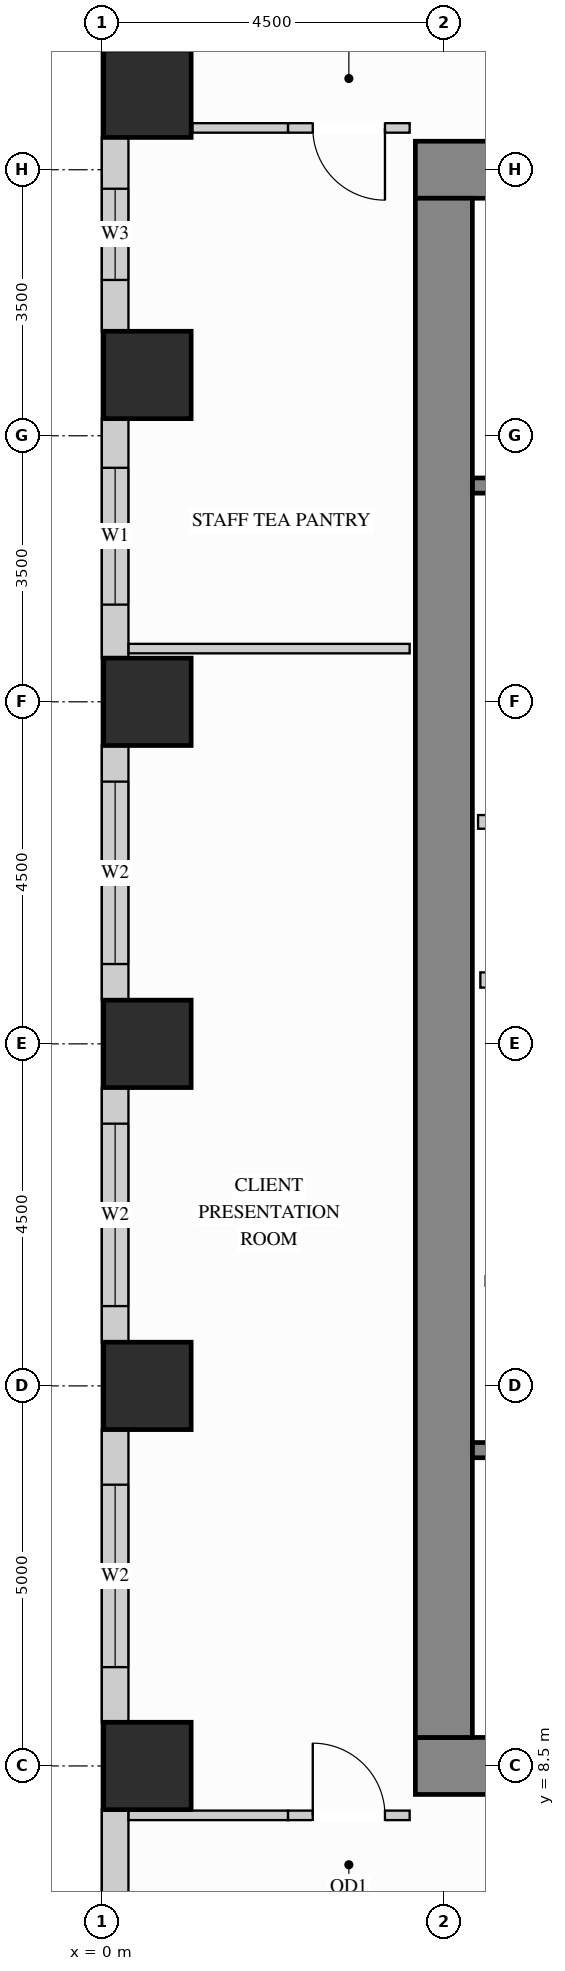
"""IFC4 building model, lengths in metres.
Left out: names, types, materials, properties, quantities, classifications, styles, units other than length and angle.
Written with IfcOpenShell. Run it as: python <this file> out.ifc"""

import sys

from ifc_helpers import new_model, si_unit, direction, frame, frame_2d, origin, origin_2d, place, context, subcontext, project, spatial, rectangle, extrude, source, transform, mapped, element, fill, save


model = new_model("IFC4")
c1 = context("Model", 3, precision=1e-05, world=origin(), true_north=direction((0.0, 1.0)))
c2 = subcontext(c1, "Body", "Model", "MODEL_VIEW")
j1 = project(units=[si_unit("LENGTHUNIT", "METRE"), si_unit("PLANEANGLEUNIT", "RADIAN")], contexts=[c1])
p1 = place(None, origin())
s1 = spatial("IfcSite", under=j1, at=p1, CompositionType="ELEMENT")
p2 = place(p1, origin())
s2 = spatial("IfcBuilding", under=s1, at=p2, CompositionType="ELEMENT")
p3 = place(p2, frame((0.0, 0.0, 135.0)))
s3 = spatial("IfcBuildingStorey", under=s2, at=p3, CompositionType="ELEMENT", Elevation=135.0)
m1 = source(origin(), c2, "Body", "SweptSolid", [
    extrude(rectangle(XDim=1.15, YDim=1.15, at=origin_2d()), origin(), (0.0, 0.0, 1.0), 3.32),
])
for number, where, z_axis, x_axis in (
    (1, (0.6, 13.5, 0.0), (0.0, 0.0, 1.0), (1.0, 0.0, 0.0)),
    (2, (0.6, 18.0, 0.0), (0.0, 0.0, 1.0), (1.0, 0.0, 0.0)),
    (3, (0.6, 22.5, 0.0), (0.0, 0.0, 1.0), (1.0, 0.0, 0.0)),
    (4, (0.6, 26.8, 0.0), (0.0, 0.0, 1.0), (1.0, 0.0, 0.0)),
    (5, (0.6, 30.5, 0.0), (0.0, 0.0, 1.0), (1.0, 0.0, 0.0)),
    (6, (0.6, 8.5, 0.0), (0.0, 0.0, 1.0), (1.0, 0.0, 0.0)),
):
    element("IfcColumn", number, at=place(p3, frame(where, z_axis=z_axis, x_axis=x_axis)), inside=s3, PredefinedType="COLUMN", context=c2, shape_type="MappedRepresentation", body=[
        mapped(m1, transform((0.0, 0.0, 0.0), x_axis=(1.0, 0.0, 0.0), y_axis=(0.0, 1.0, 0.0), z_axis=(0.0, 0.0, 1.0))),
    ])
m2 = source(origin(), c2, "Body", "SweptSolid", [
    extrude(rectangle(XDim=10.75, YDim=0.75, at=frame_2d((5.375, 0.0))), origin(), (0.0, 0.0, 1.0), 3.32),
])
for number, where, z_axis, x_axis in (
    (7, (4.125, 29.5, 0.0), (0.0, 0.0, 1.0), (1.0, 0.0, 0.0)),
    (8, (4.125, 8.5, 0.0), (0.0, 0.0, 1.0), (1.0, 0.0, 0.0)),
):
    element("IfcWall", number, at=place(p3, frame(where, z_axis=z_axis, x_axis=x_axis)), inside=s3, PredefinedType="SHEAR", context=c2, shape_type="MappedRepresentation", body=[
        mapped(m2, transform((0.0, 0.0, 0.0), x_axis=(1.0, 0.0, 0.0), y_axis=(0.0, 1.0, 0.0), z_axis=(0.0, 0.0, 1.0))),
    ])
m3 = source(origin(), c2, "Body", "SweptSolid", [
    extrude(rectangle(XDim=20.25, YDim=0.75, at=frame_2d((10.125, 0.0))), origin(), (0.0, 0.0, 1.0), 3.32),
])
p4 = place(p3, frame((4.5, 8.875, 0.0), z_axis=(0.0, 0.0, 1.0), x_axis=(0.0, 1.0, 0.0)))
e9 = element("IfcWall", 9, at=p4, inside=s3, PredefinedType="SHEAR", context=c2, shape_type="MappedRepresentation", body=[
    mapped(m3, transform((0.0, 0.0, 0.0), x_axis=(1.0, 0.0, 0.0), y_axis=(0.0, 1.0, 0.0), z_axis=(0.0, 0.0, 1.0))),
])
p5 = place(p3, frame((0.175, 29.927, 0.0), z_axis=(0.0, 0.0, 1.0), x_axis=(0.0, -1.0, 0.0)))
e10 = element("IfcWall", 10, at=p5, inside=s3, PredefinedType="SOLIDWALL", context=c2, shape_type="SweptSolid", body=[
    extrude(rectangle(XDim=2.554, YDim=0.35, at=frame_2d((1.277, 0.0))), origin(), (0.0, 0.0, 1.0), 3.305),
])
p6 = place(p5, frame((0.677, 0.0, 0.78)))
e11 = element("IfcOpeningElement", 11, at=p6, cuts=e10, PredefinedType="OPENING", context=c2, shape_type="SweptSolid", body=[
    extrude(rectangle(XDim=1.2, YDim=2.1, at=frame_2d((0.6, 1.05))), frame((0.0, 0.185, 0.0), z_axis=(0.0, -1.0, 0.0), x_axis=(1.0, 0.0, 0.0)), (0.0, 0.0, 1.0), 0.37),
])
p7 = place(p3, frame((0.175, 26.227, 0.0), z_axis=(0.0, 0.0, 1.0), x_axis=(0.0, -1.0, 0.0)))
e12 = element("IfcWall", 12, at=p7, inside=s3, PredefinedType="SOLIDWALL", context=c2, shape_type="SweptSolid", body=[
    extrude(rectangle(XDim=3.154, YDim=0.35, at=frame_2d((1.577, 0.0))), origin(), (0.0, 0.0, 1.0), 3.305),
])
p8 = place(p7, frame((0.648, 0.0, 0.78)))
e13 = element("IfcOpeningElement", 13, at=p8, cuts=e12, PredefinedType="OPENING", context=c2, shape_type="SweptSolid", body=[
    extrude(rectangle(XDim=1.8, YDim=2.1, at=frame_2d((0.9, 1.05))), frame((0.0, 0.185, 0.0), z_axis=(0.0, -1.0, 0.0), x_axis=(1.0, 0.0, 0.0)), (0.0, 0.0, 1.0), 0.37),
])
p9 = place(p3, frame((0.175, 21.927, 0.0), z_axis=(0.0, 0.0, 1.0), x_axis=(0.0, -1.0, 0.0)))
e14 = element("IfcWall", 14, at=p9, inside=s3, PredefinedType="SOLIDWALL", context=c2, shape_type="SweptSolid", body=[
    extrude(rectangle(XDim=3.354, YDim=0.35, at=frame_2d((1.677, 0.0))), origin(), (0.0, 0.0, 1.0), 3.305),
])
p10 = place(p9, frame((0.477, 0.0, 0.78)))
e15 = element("IfcOpeningElement", 15, at=p10, cuts=e14, PredefinedType="OPENING", context=c2, shape_type="SweptSolid", body=[
    extrude(rectangle(XDim=2.4, YDim=2.1, at=frame_2d((1.2, 1.05))), frame((0.0, 0.185, 0.0), z_axis=(0.0, -1.0, 0.0), x_axis=(1.0, 0.0, 0.0)), (0.0, 0.0, 1.0), 0.37),
])
p11 = place(p3, frame((0.175, 17.427, 0.0), z_axis=(0.0, 0.0, 1.0), x_axis=(0.0, -1.0, 0.0)))
e16 = element("IfcWall", 16, at=p11, inside=s3, PredefinedType="SOLIDWALL", context=c2, shape_type="SweptSolid", body=[
    extrude(rectangle(XDim=3.354, YDim=0.35, at=frame_2d((1.677, 0.0))), origin(), (0.0, 0.0, 1.0), 3.305),
])
p12 = place(p11, frame((0.477, 0.0, 0.78)))
e17 = element("IfcOpeningElement", 17, at=p12, cuts=e16, PredefinedType="OPENING", context=c2, shape_type="SweptSolid", body=[
    extrude(rectangle(XDim=2.4, YDim=2.1, at=frame_2d((1.2, 1.05))), frame((0.0, 0.185, 0.0), z_axis=(0.0, -1.0, 0.0), x_axis=(1.0, 0.0, 0.0)), (0.0, 0.0, 1.0), 0.37),
])
p13 = place(p3, frame((0.175, 12.927, 0.0), z_axis=(0.0, 0.0, 1.0), x_axis=(0.0, -1.0, 0.0)))
e18 = element("IfcWall", 18, at=p13, inside=s3, PredefinedType="SOLIDWALL", context=c2, shape_type="SweptSolid", body=[
    extrude(rectangle(XDim=3.854, YDim=0.35, at=frame_2d((1.927, 0.0))), origin(), (0.0, 0.0, 1.0), 3.305),
])
p14 = place(p13, frame((0.727, 0.0, 0.78)))
e19 = element("IfcOpeningElement", 19, at=p14, cuts=e18, PredefinedType="OPENING", context=c2, shape_type="SweptSolid", body=[
    extrude(rectangle(XDim=2.4, YDim=2.1, at=frame_2d((1.2, 1.05))), frame((0.0, 0.185, 0.0), z_axis=(0.0, -1.0, 0.0), x_axis=(1.0, 0.0, 0.0)), (0.0, 0.0, 1.0), 0.37),
])
p15 = place(p3, frame((0.175, 7.927, 0.0), z_axis=(0.0, 0.0, 1.0), x_axis=(0.0, -1.0, 0.0)))
e20 = element("IfcWall", 20, at=p15, inside=s3, PredefinedType="SOLIDWALL", context=c2, shape_type="SweptSolid", body=[
    extrude(rectangle(XDim=3.854, YDim=0.35, at=frame_2d((1.927, 0.0))), origin(), (0.0, 0.0, 1.0), 3.305),
])
p16 = place(p15, frame((2.156, 0.0, 0.78)))
e21 = element("IfcOpeningElement", 21, at=p16, cuts=e20, PredefinedType="OPENING", context=c2, shape_type="SweptSolid", body=[
    extrude(rectangle(XDim=1.2, YDim=2.1, at=frame_2d((0.6, 1.05))), frame((0.0, 0.185, 0.0), z_axis=(0.0, -1.0, 0.0), x_axis=(1.0, 0.0, 0.0)), (0.0, 0.0, 1.0), 0.37),
])
m4 = source(origin(), c2, "Body", "SweptSolid", [
    extrude(rectangle(XDim=2.2, YDim=0.18, at=frame_2d((1.1, 0.0))), origin(), (0.0, 0.0, 1.0), 3.305),
])
p17 = place(p3, frame((4.95, 20.92, 0.0), z_axis=(0.0, 0.0, 1.0), x_axis=(1.0, 0.0, 0.0)))
e22 = element("IfcWall", 22, at=p17, inside=s3, PredefinedType="PARTITIONING", context=c2, shape_type="MappedRepresentation", body=[
    mapped(m4, transform((0.0, 0.0, 0.0), x_axis=(1.0, 0.0, 0.0), y_axis=(0.0, 1.0, 0.0), z_axis=(0.0, 0.0, 1.0))),
])
p18 = place(p3, frame((5.05, 14.88, 0.0), z_axis=(0.0, 0.0, 1.0), x_axis=(1.0, 0.0, 0.0)))
e23 = element("IfcWall", 23, at=p18, inside=s3, PredefinedType="PARTITIONING", context=c2, shape_type="SweptSolid", body=[
    extrude(rectangle(XDim=2.35, YDim=0.125, at=frame_2d((1.175, 0.0))), origin(), (0.0, 0.0, 1.0), 3.305),
])
p19 = place(p18, frame((0.7, 0.0, 0.0)))
e24 = element("IfcOpeningElement", 24, at=p19, cuts=e23, PredefinedType="OPENING", context=c2, shape_type="SweptSolid", body=[
    extrude(rectangle(XDim=0.85, YDim=2.1, at=frame_2d((0.425, 1.05))), frame((0.0, 0.073, 0.0), z_axis=(0.0, -1.0, 0.0), x_axis=(1.0, 0.0, 0.0)), (0.0, 0.0, 1.0), 0.145),
])
m5 = source(origin(), c2, "Body", "SweptSolid", [
    extrude(rectangle(XDim=1.26, YDim=0.125, at=frame_2d((0.63, 0.0))), origin(), (0.0, 0.0, 1.0), 3.305),
])
p20 = place(p3, frame((1.19, 30.05, 0.0), z_axis=(0.0, 0.0, 1.0), x_axis=(1.0, 0.0, 0.0)))
e25 = element("IfcWall", 25, at=p20, inside=s3, PredefinedType="PARTITIONING", context=c2, shape_type="MappedRepresentation", body=[
    mapped(m5, transform((0.0, 0.0, 0.0), x_axis=(1.0, 0.0, 0.0), y_axis=(0.0, 1.0, 0.0), z_axis=(0.0, 0.0, 1.0))),
])
p21 = place(p3, frame((2.45, 30.05, 0.0), z_axis=(0.0, 0.0, 1.0), x_axis=(1.0, 0.0, 0.0)))
e26 = element("IfcWall", 26, at=p21, inside=s3, PredefinedType="PARTITIONING", context=c2, shape_type="SweptSolid", body=[
    extrude(rectangle(XDim=1.6, YDim=0.125, at=frame_2d((0.8, 0.0))), origin(), (0.0, 0.0, 1.0), 3.305),
])
p22 = place(p21, frame((0.325, 0.0, 0.0)))
e27 = element("IfcOpeningElement", 27, at=p22, cuts=e26, PredefinedType="OPENING", context=c2, shape_type="SweptSolid", body=[
    extrude(rectangle(XDim=0.95, YDim=2.15, at=frame_2d((0.475, 1.075))), frame((0.0, 0.073, 0.0), z_axis=(0.0, -1.0, 0.0), x_axis=(1.0, 0.0, 0.0)), (0.0, 0.0, 1.0), 0.145),
])
m6 = source(origin(), c2, "Body", "SweptSolid", [
    extrude(rectangle(XDim=2.098, YDim=0.125, at=frame_2d((1.049, 0.0))), origin(), (0.0, 0.0, 1.0), 3.305),
])
p23 = place(p3, frame((0.352, 7.85, 0.0), z_axis=(0.0, 0.0, 1.0), x_axis=(1.0, 0.0, 0.0)))
e28 = element("IfcWall", 28, at=p23, inside=s3, PredefinedType="PARTITIONING", context=c2, shape_type="MappedRepresentation", body=[
    mapped(m6, transform((0.0, 0.0, 0.0), x_axis=(1.0, 0.0, 0.0), y_axis=(0.0, 1.0, 0.0), z_axis=(0.0, 0.0, 1.0))),
])
p24 = place(p3, frame((2.45, 7.85, 0.0), z_axis=(0.0, 0.0, 1.0), x_axis=(1.0, 0.0, 0.0)))
e29 = element("IfcWall", 29, at=p24, inside=s3, PredefinedType="PARTITIONING", context=c2, shape_type="SweptSolid", body=[
    extrude(rectangle(XDim=1.6, YDim=0.125, at=frame_2d((0.8, 0.0))), origin(), (0.0, 0.0, 1.0), 3.305),
])
p25 = place(p24, frame((0.325, 0.0, 0.0)))
e30 = element("IfcOpeningElement", 30, at=p25, cuts=e29, PredefinedType="OPENING", context=c2, shape_type="SweptSolid", body=[
    extrude(rectangle(XDim=0.95, YDim=2.15, at=frame_2d((0.475, 1.075))), frame((0.0, 0.073, 0.0), z_axis=(0.0, -1.0, 0.0), x_axis=(1.0, 0.0, 0.0)), (0.0, 0.0, 1.0), 0.145),
])
m7 = source(origin(), c2, "Body", "SweptSolid", [
    extrude(rectangle(XDim=3.698, YDim=0.125, at=frame_2d((1.849, 0.0))), origin(), (0.0, 0.0, 1.0), 3.305),
])
p26 = place(p3, frame((0.352, 23.2, 0.0), z_axis=(0.0, 0.0, 1.0), x_axis=(1.0, 0.0, 0.0)))
e31 = element("IfcWall", 31, at=p26, inside=s3, PredefinedType="PARTITIONING", context=c2, shape_type="MappedRepresentation", body=[
    mapped(m7, transform((0.0, 0.0, 0.0), x_axis=(1.0, 0.0, 0.0), y_axis=(0.0, 1.0, 0.0), z_axis=(0.0, 0.0, 1.0))),
])
m8 = source(origin(), c2, "Body", "SweptSolid", [
    extrude(rectangle(XDim=2.09, YDim=0.2, at=frame_2d((1.045, 0.0))), origin(), (0.0, 0.0, 1.0), 3.305),
])
p27 = place(p3, frame((4.98, 18.84, 0.0), z_axis=(0.0, 0.0, 1.0), x_axis=(1.0, 0.0, 0.0)))
e32 = element("IfcWall", 32, at=p27, inside=s3, PredefinedType="PARTITIONING", context=c2, shape_type="MappedRepresentation", body=[
    mapped(m8, transform((0.0, 0.0, 0.0), x_axis=(1.0, 0.0, 0.0), y_axis=(0.0, 1.0, 0.0), z_axis=(0.0, 0.0, 1.0))),
])
p28 = place(p3, frame((4.877, 12.655, 0.0), z_axis=(0.0, 0.0, 1.0), x_axis=(1.0, 0.0, 0.0)))
e33 = element("IfcWall", 33, at=p28, inside=s3, PredefinedType="SHEAR", context=c2, shape_type="SweptSolid", body=[
    extrude(rectangle(XDim=7.528, YDim=0.2, at=frame_2d((3.764, 0.0))), origin(), (0.0, 0.0, 1.0), 3.32),
])
p29 = place(p28, frame((0.4, 0.0, 0.0)))
e34 = element("IfcOpeningElement", 34, at=p29, cuts=e33, PredefinedType="OPENING", context=c2, shape_type="SweptSolid", body=[
    extrude(rectangle(XDim=1.1, YDim=2.15, at=frame_2d((0.55, 1.075))), frame((0.0, 0.11, 0.0), z_axis=(0.0, -1.0, 0.0), x_axis=(1.0, 0.0, 0.0)), (0.0, 0.0, 1.0), 0.22),
])
p30 = place(p3, frame((4.877, 25.345, 0.0), z_axis=(0.0, 0.0, 1.0), x_axis=(1.0, 0.0, 0.0)))
e35 = element("IfcWall", 35, at=p30, inside=s3, PredefinedType="SHEAR", context=c2, shape_type="SweptSolid", body=[
    extrude(rectangle(XDim=7.528, YDim=0.2, at=frame_2d((3.764, 0.0))), origin(), (0.0, 0.0, 1.0), 3.32),
])
p31 = place(p30, frame((0.4, 0.0, 0.0)))
e36 = element("IfcOpeningElement", 36, at=p31, cuts=e35, PredefinedType="OPENING", context=c2, shape_type="SweptSolid", body=[
    extrude(rectangle(XDim=1.1, YDim=2.15, at=frame_2d((0.55, 1.075))), frame((0.0, 0.11, 0.0), z_axis=(0.0, -1.0, 0.0), x_axis=(1.0, 0.0, 0.0)), (0.0, 0.0, 1.0), 0.22),
])
m9 = source(origin(), c2, "Body", "SweptSolid", [
    extrude(rectangle(XDim=0.95, YDim=2.15, at=frame_2d((0.475, 1.075))), frame((0.0, 0.025, 0.0), z_axis=(0.0, -1.0, 0.0), x_axis=(1.0, 0.0, 0.0)), (0.0, 0.0, 1.0), 0.05),
])
p32 = place(p25, origin())
e37 = element("IfcDoor", 37, at=p32, inside=s3, OperationType="SINGLE_SWING_LEFT", PredefinedType="DOOR", context=c2, shape_type="MappedRepresentation", body=[
    mapped(m9, transform((0.0, 0.0, 0.0), x_axis=(1.0, 0.0, 0.0), y_axis=(0.0, 1.0, 0.0), z_axis=(0.0, 0.0, 1.0))),
])
fill(e30, e37)
p33 = place(p22, origin())
e38 = element("IfcDoor", 38, at=p33, inside=s3, OperationType="SINGLE_SWING_RIGHT", PredefinedType="DOOR", context=c2, shape_type="MappedRepresentation", body=[
    mapped(m9, transform((0.0, 0.0, 0.0), x_axis=(1.0, 0.0, 0.0), y_axis=(0.0, 1.0, 0.0), z_axis=(0.0, 0.0, 1.0))),
])
fill(e27, e38)
m10 = source(origin(), c2, "Body", "SweptSolid", [
    extrude(rectangle(XDim=1.8, YDim=2.1, at=frame_2d((0.9, 1.05))), frame((0.0, 0.03, 0.0), z_axis=(0.0, -1.0, 0.0), x_axis=(1.0, 0.0, 0.0)), (0.0, 0.0, 1.0), 0.06),
])
p34 = place(p8, origin())
e39 = element("IfcWindow", 39, at=p34, inside=s3, PartitioningType="SINGLE_PANEL", PredefinedType="WINDOW", context=c2, shape_type="MappedRepresentation", body=[
    mapped(m10, transform((0.0, 0.0, 0.0), x_axis=(1.0, 0.0, 0.0), y_axis=(0.0, 1.0, 0.0), z_axis=(0.0, 0.0, 1.0))),
])
fill(e13, e39)
m11 = source(origin(), c2, "Body", "SweptSolid", [
    extrude(rectangle(XDim=2.4, YDim=2.1, at=frame_2d((1.2, 1.05))), frame((0.0, 0.03, 0.0), z_axis=(0.0, -1.0, 0.0), x_axis=(1.0, 0.0, 0.0)), (0.0, 0.0, 1.0), 0.06),
])
p35 = place(p10, origin())
e40 = element("IfcWindow", 40, at=p35, inside=s3, PartitioningType="SINGLE_PANEL", PredefinedType="WINDOW", context=c2, shape_type="MappedRepresentation", body=[
    mapped(m11, transform((0.0, 0.0, 0.0), x_axis=(1.0, 0.0, 0.0), y_axis=(0.0, 1.0, 0.0), z_axis=(0.0, 0.0, 1.0))),
])
fill(e15, e40)
p36 = place(p12, origin())
e41 = element("IfcWindow", 41, at=p36, inside=s3, PartitioningType="SINGLE_PANEL", PredefinedType="WINDOW", context=c2, shape_type="MappedRepresentation", body=[
    mapped(m11, transform((0.0, 0.0, 0.0), x_axis=(1.0, 0.0, 0.0), y_axis=(0.0, 1.0, 0.0), z_axis=(0.0, 0.0, 1.0))),
])
fill(e17, e41)
p37 = place(p14, origin())
e42 = element("IfcWindow", 42, at=p37, inside=s3, PartitioningType="SINGLE_PANEL", PredefinedType="WINDOW", context=c2, shape_type="MappedRepresentation", body=[
    mapped(m11, transform((0.0, 0.0, 0.0), x_axis=(1.0, 0.0, 0.0), y_axis=(0.0, 1.0, 0.0), z_axis=(0.0, 0.0, 1.0))),
])
fill(e19, e42)
m12 = source(origin(), c2, "Body", "SweptSolid", [
    extrude(rectangle(XDim=1.2, YDim=2.1, at=frame_2d((0.6, 1.05))), frame((0.0, 0.03, 0.0), z_axis=(0.0, -1.0, 0.0), x_axis=(1.0, 0.0, 0.0)), (0.0, 0.0, 1.0), 0.06),
])
p38 = place(p6, origin())
e43 = element("IfcWindow", 43, at=p38, inside=s3, PartitioningType="SINGLE_PANEL", PredefinedType="WINDOW", context=c2, shape_type="MappedRepresentation", body=[
    mapped(m12, transform((0.0, 0.0, 0.0), x_axis=(1.0, 0.0, 0.0), y_axis=(0.0, 1.0, 0.0), z_axis=(0.0, 0.0, 1.0))),
])
fill(e11, e43)
save(model, sys.argv[1])
